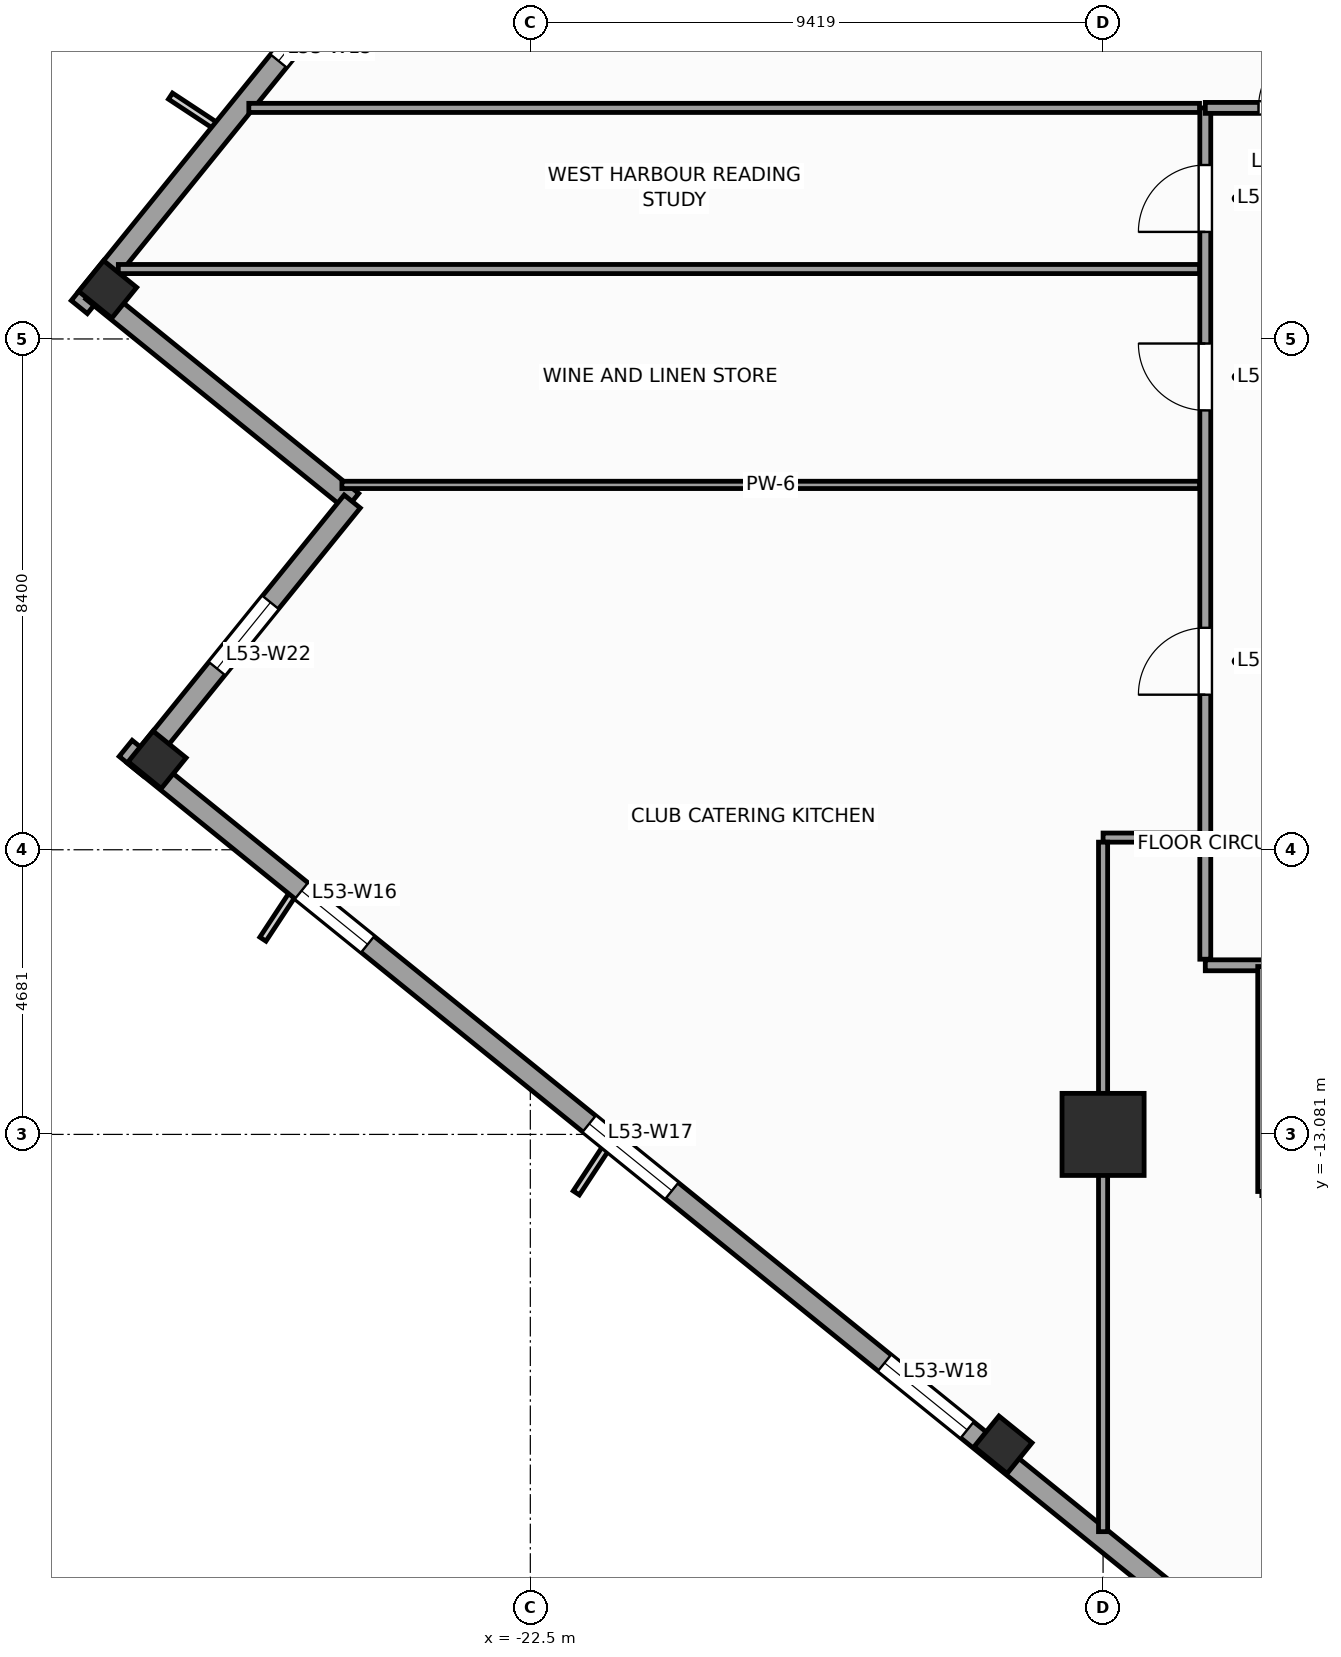
"""IFC4 building model, lengths in metres.
Left out: names, types, materials, properties, quantities, classifications, styles, units other than length and angle.
Written with IfcOpenShell. Run it as: python <this file> out.ifc"""

import sys

from ifc_helpers import new_model, si_unit, direction, frame, frame_2d, origin, origin_2d, place, context, subcontext, project, spatial, rectangle, extrude, source, transform, mapped, element, fill, save


model = new_model("IFC4")
c1 = context("Model", 3, precision=1e-05, world=origin(), true_north=direction((0.0, 1.0)))
c2 = subcontext(c1, "Body", "Model", "MODEL_VIEW")
j1 = project(units=[si_unit("LENGTHUNIT", "METRE"), si_unit("PLANEANGLEUNIT", "RADIAN")], contexts=[c1])
p1 = place(None, origin())
s1 = spatial("IfcSite", under=j1, at=p1, CompositionType="ELEMENT")
p2 = place(p1, origin())
s2 = spatial("IfcBuilding", under=s1, at=p2, CompositionType="ELEMENT")
p3 = place(p2, frame((0.0, 0.0, 221.2)))
s3 = spatial("IfcBuildingStorey", under=s2, at=p3, CompositionType="ELEMENT", Elevation=221.2)
m1 = source(origin(), c2, "Body", "SweptSolid", [
    extrude(rectangle(XDim=1.35, YDim=1.35, at=origin_2d()), origin(), (0.0, 0.0, 1.0), 3.9),
])
p4 = place(p3, frame((-13.081, -13.081, 0.0), z_axis=(0.0, 0.0, 1.0), x_axis=(1.0, 0.0, 0.0)))
e1 = element("IfcColumn", 1, at=p4, inside=s3, PredefinedType="COLUMN", context=c2, shape_type="MappedRepresentation", body=[
    mapped(m1, transform((0.0, 0.0, 0.0), scale=1.0)),
])
m2 = source(origin(), c2, "Body", "SweptSolid", [
    extrude(rectangle(XDim=0.65, YDim=0.7, at=origin_2d()), origin(), (0.0, 0.0, 1.0), 3.9),
])
for number, where, z_axis, x_axis in (
    (2, (-29.45, 0.815, 0.0), (0.0, 0.0, 1.0), (0.629, 0.777, 0.0)),
    (3, (-28.637, -6.92, 0.0), (0.0, 0.0, 1.0), (0.629, 0.777, 0.0)),
    (4, (-14.726, -18.185, 0.0), (0.0, 0.0, 1.0), (0.629, 0.777, 0.0)),
):
    element("IfcColumn", number, at=place(p3, frame(where, z_axis=z_axis, x_axis=x_axis)), inside=s3, PredefinedType="COLUMN", context=c2, shape_type="MappedRepresentation", body=[
        mapped(m2, transform((0.0, 0.0, 0.0), scale=1.0)),
    ])
p5 = place(p3, frame((-6.733, 29.154, 0.0), z_axis=(0.0, 0.0, 1.0), x_axis=(-0.629325378072, -0.77714192302, 0.0)))
e5 = element("IfcWall", 5, at=p5, inside=s3, PredefinedType="STANDARD", context=c2, shape_type="SweptSolid", body=[
    extrude(rectangle(XDim=36.84, YDim=0.34, at=frame_2d((18.42, 0.0))), origin(), (0.0, 0.0, 1.0), 2.96),
])
p6 = place(p5, frame((23.495, 0.0, 0.0)))
e6 = element("IfcOpeningElement", 6, at=p6, cuts=e5, PredefinedType="OPENING", context=c2, shape_type="SweptSolid", body=[
    extrude(rectangle(XDim=1.05, YDim=2.25, at=frame_2d((0.525, 1.125))), frame((0.0, 0.18, 0.0), z_axis=(0.0, -1.0, 0.0), x_axis=(1.0, 0.0, 0.0)), (0.0, 0.0, 1.0), 0.36),
])
p7 = place(p5, frame((3.721, 0.0, 0.48)))
e7 = element("IfcOpeningElement", 7, at=p7, cuts=e5, PredefinedType="OPENING", context=c2, shape_type="SweptSolid", body=[
    extrude(rectangle(XDim=1.4, YDim=2.4, at=frame_2d((0.7, 1.2))), frame((0.0, 0.18, 0.0), z_axis=(0.0, -1.0, 0.0), x_axis=(1.0, 0.0, 0.0)), (0.0, 0.0, 1.0), 0.36),
])
p8 = place(p5, frame((9.809, 0.0, 0.58)))
e8 = element("IfcOpeningElement", 8, at=p8, cuts=e5, PredefinedType="OPENING", context=c2, shape_type="SweptSolid", body=[
    extrude(rectangle(XDim=1.75, YDim=2.3, at=frame_2d((0.875, 1.15))), frame((0.0, 0.18, 0.0), z_axis=(0.0, -1.0, 0.0), x_axis=(1.0, 0.0, 0.0)), (0.0, 0.0, 1.0), 0.36),
])
p9 = place(p5, frame((16.058, 0.0, 0.58)))
e9 = element("IfcOpeningElement", 9, at=p9, cuts=e5, PredefinedType="OPENING", context=c2, shape_type="SweptSolid", body=[
    extrude(rectangle(XDim=1.75, YDim=2.3, at=frame_2d((0.875, 1.15))), frame((0.0, 0.18, 0.0), z_axis=(0.0, -1.0, 0.0), x_axis=(1.0, 0.0, 0.0)), (0.0, 0.0, 1.0), 0.36),
])
p10 = place(p5, frame((25.676, 0.0, 0.58)))
e10 = element("IfcOpeningElement", 10, at=p10, cuts=e5, PredefinedType="OPENING", context=c2, shape_type="SweptSolid", body=[
    extrude(rectangle(XDim=1.75, YDim=2.3, at=frame_2d((0.875, 1.15))), frame((0.0, 0.18, 0.0), z_axis=(0.0, -1.0, 0.0), x_axis=(1.0, 0.0, 0.0)), (0.0, 0.0, 1.0), 0.36),
])
p11 = place(p5, frame((30.232, 0.0, 0.48)))
e11 = element("IfcOpeningElement", 11, at=p11, cuts=e5, PredefinedType="OPENING", context=c2, shape_type="SweptSolid", body=[
    extrude(rectangle(XDim=1.4, YDim=2.4, at=frame_2d((0.7, 1.2))), frame((0.0, 0.18, 0.0), z_axis=(0.0, -1.0, 0.0), x_axis=(1.0, 0.0, 0.0)), (0.0, 0.0, 1.0), 0.36),
])
p12 = place(p3, frame((-29.703, 0.789, 0.0), z_axis=(0.0, 0.0, 1.0), x_axis=(0.77714355312, -0.629323365087, 0.0)))
e12 = element("IfcWall", 12, at=p12, inside=s3, PredefinedType="STANDARD", context=c2, shape_type="SweptSolid", body=[
    extrude(rectangle(XDim=5.5, YDim=0.34, at=frame_2d((2.75, 0.0))), origin(), (0.0, 0.0, 1.0), 3.66),
])
p13 = place(p3, frame((-25.429, -2.673, 0.0), z_axis=(0.0, 0.0, 1.0), x_axis=(-0.629299794138, -0.777162640055, 0.0)))
e13 = element("IfcWall", 13, at=p13, inside=s3, PredefinedType="STANDARD", context=c2, shape_type="SweptSolid", body=[
    extrude(rectangle(XDim=5.67, YDim=0.34, at=frame_2d((2.835, 0.0))), origin(), (0.0, 0.0, 1.0), 3.66),
])
p14 = place(p13, frame((2.135, 0.0, 0.48)))
e14 = element("IfcOpeningElement", 14, at=p14, cuts=e13, PredefinedType="OPENING", context=c2, shape_type="SweptSolid", body=[
    extrude(rectangle(XDim=1.4, YDim=2.4, at=frame_2d((0.7, 1.2))), frame((0.0, 0.18, 0.0), z_axis=(0.0, -1.0, 0.0), x_axis=(1.0, 0.0, 0.0)), (0.0, 0.0, 1.0), 0.36),
])
p15 = place(p3, frame((-29.154, -6.733, 0.0), z_axis=(0.0, 0.0, 1.0), x_axis=(0.77714192302, -0.629325378072, 0.0)))
e15 = element("IfcWall", 15, at=p15, inside=s3, PredefinedType="STANDARD", context=c2, shape_type="SweptSolid", body=[
    extrude(rectangle(XDim=36.84, YDim=0.34, at=frame_2d((18.42, 0.0))), origin(), (0.0, 0.0, 1.0), 2.96),
])
p16 = place(p15, frame((3.721, 0.0, 0.48)))
e16 = element("IfcOpeningElement", 16, at=p16, cuts=e15, PredefinedType="OPENING", context=c2, shape_type="SweptSolid", body=[
    extrude(rectangle(XDim=1.4, YDim=2.4, at=frame_2d((0.7, 1.2))), frame((0.0, 0.18, 0.0), z_axis=(0.0, -1.0, 0.0), x_axis=(1.0, 0.0, 0.0)), (0.0, 0.0, 1.0), 0.36),
])
p17 = place(p15, frame((9.809, 0.0, 0.58)))
e17 = element("IfcOpeningElement", 17, at=p17, cuts=e15, PredefinedType="OPENING", context=c2, shape_type="SweptSolid", body=[
    extrude(rectangle(XDim=1.75, YDim=2.3, at=frame_2d((0.875, 1.15))), frame((0.0, 0.18, 0.0), z_axis=(0.0, -1.0, 0.0), x_axis=(1.0, 0.0, 0.0)), (0.0, 0.0, 1.0), 0.36),
])
p18 = place(p15, frame((16.058, 0.0, 0.58)))
e18 = element("IfcOpeningElement", 18, at=p18, cuts=e15, PredefinedType="OPENING", context=c2, shape_type="SweptSolid", body=[
    extrude(rectangle(XDim=1.75, YDim=2.3, at=frame_2d((0.875, 1.15))), frame((0.0, 0.18, 0.0), z_axis=(0.0, -1.0, 0.0), x_axis=(1.0, 0.0, 0.0)), (0.0, 0.0, 1.0), 0.36),
])
p19 = place(p15, frame((24.176, 0.0, 0.58)))
e19 = element("IfcOpeningElement", 19, at=p19, cuts=e15, PredefinedType="OPENING", context=c2, shape_type="SweptSolid", body=[
    extrude(rectangle(XDim=1.75, YDim=2.3, at=frame_2d((0.875, 1.15))), frame((0.0, 0.18, 0.0), z_axis=(0.0, -1.0, 0.0), x_axis=(1.0, 0.0, 0.0)), (0.0, 0.0, 1.0), 0.36),
])
p20 = place(p15, frame((30.232, 0.0, 0.48)))
e20 = element("IfcOpeningElement", 20, at=p20, cuts=e15, PredefinedType="OPENING", context=c2, shape_type="SweptSolid", body=[
    extrude(rectangle(XDim=1.4, YDim=2.4, at=frame_2d((0.7, 1.2))), frame((0.0, 0.18, 0.0), z_axis=(0.0, -1.0, 0.0), x_axis=(1.0, 0.0, 0.0)), (0.0, 0.0, 1.0), 0.36),
])
p21 = place(p3, frame((-11.4, -10.3, 0.0), z_axis=(0.0, 0.0, 1.0), x_axis=(1.0, 0.0, 0.0)))
e21 = element("IfcWall", 21, at=p21, inside=s3, PredefinedType="PARTITIONING", context=c2, shape_type="SweptSolid", body=[
    extrude(rectangle(XDim=22.75, YDim=0.18, at=frame_2d((11.375, 0.0))), origin(), (0.0, 0.0, 1.0), 3.66),
])
p22 = place(p21, frame((8.436, 0.0, 0.0)))
e22 = element("IfcOpeningElement", 22, at=p22, cuts=e21, PredefinedType="OPENING", context=c2, shape_type="SweptSolid", body=[
    extrude(rectangle(XDim=0.95, YDim=2.1, at=frame_2d((0.475, 1.05))), frame((0.0, 0.1, 0.0), z_axis=(0.0, -1.0, 0.0), x_axis=(1.0, 0.0, 0.0)), (0.0, 0.0, 1.0), 0.2),
])
p23 = place(p21, frame((1.58, 0.0, 0.0)))
e23 = element("IfcOpeningElement", 23, at=p23, cuts=e21, PredefinedType="OPENING", context=c2, shape_type="SweptSolid", body=[
    extrude(rectangle(XDim=0.95, YDim=2.1, at=frame_2d((0.475, 1.05))), frame((0.0, 0.1, 0.0), z_axis=(0.0, -1.0, 0.0), x_axis=(1.0, 0.0, 0.0)), (0.0, 0.0, 1.0), 0.2),
])
p24 = place(p21, frame((4.834, 0.0, 0.0)))
e24 = element("IfcOpeningElement", 24, at=p24, cuts=e21, PredefinedType="OPENING", context=c2, shape_type="SweptSolid", body=[
    extrude(rectangle(XDim=1.1, YDim=2.2, at=frame_2d((0.55, 1.1))), frame((0.0, 0.1, 0.0), z_axis=(0.0, -1.0, 0.0), x_axis=(1.0, 0.0, 0.0)), (0.0, 0.0, 1.0), 0.2),
])
p25 = place(p21, frame((12.0, 0.0, 0.0)))
e25 = element("IfcOpeningElement", 25, at=p25, cuts=e21, PredefinedType="OPENING", context=c2, shape_type="SweptSolid", body=[
    extrude(rectangle(XDim=1.1, YDim=2.2, at=frame_2d((0.55, 1.1))), frame((0.0, 0.1, 0.0), z_axis=(0.0, -1.0, 0.0), x_axis=(1.0, 0.0, 0.0)), (0.0, 0.0, 1.0), 0.2),
])
p26 = place(p21, frame((18.041, 0.0, 0.0)))
e26 = element("IfcOpeningElement", 26, at=p26, cuts=e21, PredefinedType="OPENING", context=c2, shape_type="SweptSolid", body=[
    extrude(rectangle(XDim=1.1, YDim=2.2, at=frame_2d((0.55, 1.1))), frame((0.0, 0.1, 0.0), z_axis=(0.0, -1.0, 0.0), x_axis=(1.0, 0.0, 0.0)), (0.0, 0.0, 1.0), 0.2),
])
p27 = place(p3, frame((-11.4, -10.2, 0.0), z_axis=(0.0, 0.0, 1.0), x_axis=(0.0, 1.0, 0.0)))
e27 = element("IfcWall", 27, at=p27, inside=s3, PredefinedType="PARTITIONING", context=c2, shape_type="SweptSolid", body=[
    extrude(rectangle(XDim=14.0, YDim=0.18, at=frame_2d((7.0, 0.0))), origin(), (0.0, 0.0, 1.0), 3.66),
])
p28 = place(p27, frame((11.96, 0.0, 0.0)))
e28 = element("IfcOpeningElement", 28, at=p28, cuts=e27, PredefinedType="OPENING", context=c2, shape_type="SweptSolid", body=[
    extrude(rectangle(XDim=1.1, YDim=2.2, at=frame_2d((0.55, 1.1))), frame((0.0, 0.1, 0.0), z_axis=(0.0, -1.0, 0.0), x_axis=(1.0, 0.0, 0.0)), (0.0, 0.0, 1.0), 0.2),
])
p29 = place(p27, frame((9.025, 0.0, 0.0)))
e29 = element("IfcOpeningElement", 29, at=p29, cuts=e27, PredefinedType="OPENING", context=c2, shape_type="SweptSolid", body=[
    extrude(rectangle(XDim=1.1, YDim=2.2, at=frame_2d((0.55, 1.1))), frame((0.0, 0.1, 0.0), z_axis=(0.0, -1.0, 0.0), x_axis=(1.0, 0.0, 0.0)), (0.0, 0.0, 1.0), 0.2),
])
p30 = place(p27, frame((4.35, 0.0, 0.0)))
e30 = element("IfcOpeningElement", 30, at=p30, cuts=e27, PredefinedType="OPENING", context=c2, shape_type="SweptSolid", body=[
    extrude(rectangle(XDim=1.1, YDim=2.2, at=frame_2d((0.55, 1.1))), frame((0.0, 0.1, 0.0), z_axis=(0.0, -1.0, 0.0), x_axis=(1.0, 0.0, 0.0)), (0.0, 0.0, 1.0), 0.2),
])
p31 = place(p3, frame((-11.4, 3.8, 0.0), z_axis=(0.0, 0.0, 1.0), x_axis=(1.0, 0.0, 0.0)))
e31 = element("IfcWall", 31, at=p31, inside=s3, PredefinedType="PARTITIONING", context=c2, shape_type="SweptSolid", body=[
    extrude(rectangle(XDim=2.85, YDim=0.18, at=frame_2d((1.425, 0.0))), origin(), (0.0, 0.0, 1.0), 3.66),
])
p32 = place(p31, frame((0.875, 0.0, 0.0)))
e32 = element("IfcOpeningElement", 32, at=p32, cuts=e31, PredefinedType="OPENING", context=c2, shape_type="SweptSolid", body=[
    extrude(rectangle(XDim=1.1, YDim=2.2, at=frame_2d((0.55, 1.1))), frame((0.0, 0.1, 0.0), z_axis=(0.0, -1.0, 0.0), x_axis=(1.0, 0.0, 0.0)), (0.0, 0.0, 1.0), 0.2),
])
p33 = place(p3, frame((-29.275, 1.15, 0.0), z_axis=(0.0, 0.0, 1.0), x_axis=(1.0, 0.0, 0.0)))
e33 = element("IfcWall", 33, at=p33, inside=s3, PredefinedType="PARTITIONING", context=c2, shape_type="SweptSolid", body=[
    extrude(rectangle(XDim=17.78, YDim=0.15, at=frame_2d((8.89, 0.0))), origin(), (0.0, 0.0, 1.0), 3.66),
])
p34 = place(p3, frame((-27.129, 3.8, 0.0), z_axis=(0.0, 0.0, 1.0), x_axis=(1.0, 0.0, 0.0)))
e34 = element("IfcWall", 34, at=p34, inside=s3, PredefinedType="PARTITIONING", context=c2, shape_type="SweptSolid", body=[
    extrude(rectangle(XDim=15.634, YDim=0.15, at=frame_2d((7.817, 0.0))), origin(), (0.0, 0.0, 1.0), 3.66),
])
p35 = place(p3, frame((-11.495, -8.2, 0.0), z_axis=(0.0, 0.0, 1.0), x_axis=(-1.0, 0.0, 0.0)))
e35 = element("IfcWall", 35, at=p35, inside=s3, PredefinedType="PARTITIONING", context=c2, shape_type="SweptSolid", body=[
    extrude(rectangle(XDim=1.586, YDim=0.15, at=frame_2d((0.793, 0.0))), origin(), (0.0, 0.0, 1.0), 3.66),
])
p36 = place(p3, frame((-13.081, -8.275, 0.0), z_axis=(0.0, 0.0, 1.0), x_axis=(0.0, -1.0, 0.0)))
e36 = element("IfcWall", 36, at=p36, inside=s3, PredefinedType="PARTITIONING", context=c2, shape_type="SweptSolid", body=[
    extrude(rectangle(XDim=11.339, YDim=0.15, at=frame_2d((5.669, 0.0))), origin(), (0.0, 0.0, 1.0), 2.76),
])
p37 = place(p3, frame((-25.599, -2.4, 0.0), z_axis=(0.0, 0.0, 1.0), x_axis=(1.0, 0.0, 0.0)))
e37 = element("IfcWall", 37, at=p37, inside=s3, PredefinedType="PARTITIONING", context=c2, shape_type="SweptSolid", body=[
    extrude(rectangle(XDim=14.104, YDim=0.12, at=frame_2d((7.052, 0.0))), origin(), (0.0, 0.0, 1.0), 3.66),
])
p38 = place(p3, frame((-10.47, -14.02, 0.0), z_axis=(0.0, 0.0, 1.0), x_axis=(0.0, 1.0, 0.0)))
e38 = element("IfcWall", 38, at=p38, inside=s3, PredefinedType="PARTITIONING", context=c2, shape_type="SweptSolid", body=[
    extrude(rectangle(XDim=3.7, YDim=0.135, at=frame_2d((1.85, 0.0))), origin(), (0.0, 0.0, 1.0), 3.66),
])
m3 = source(origin(), c2, "Body", "SweptSolid", [
    extrude(rectangle(XDim=1.4, YDim=2.4, at=frame_2d((0.7, 1.2))), frame((0.0, 0.03, 0.0), z_axis=(0.0, -1.0, 0.0), x_axis=(1.0, 0.0, 0.0)), (0.0, 0.0, 1.0), 0.06),
])
p39 = place(p11, origin())
e39 = element("IfcWindow", 39, at=p39, inside=s3, PartitioningType="SINGLE_PANEL", PredefinedType="WINDOW", context=c2, shape_type="MappedRepresentation", body=[
    mapped(m3, transform((0.0, 0.0, 0.0), scale=1.0)),
])
fill(e11, e39)
p40 = place(p16, origin())
e40 = element("IfcWindow", 40, at=p40, inside=s3, PartitioningType="SINGLE_PANEL", PredefinedType="WINDOW", context=c2, shape_type="MappedRepresentation", body=[
    mapped(m3, transform((0.0, 0.0, 0.0), scale=1.0)),
])
fill(e16, e40)
m4 = source(origin(), c2, "Body", "SweptSolid", [
    extrude(rectangle(XDim=1.75, YDim=2.3, at=frame_2d((0.875, 1.15))), frame((0.0, 0.03, 0.0), z_axis=(0.0, -1.0, 0.0), x_axis=(1.0, 0.0, 0.0)), (0.0, 0.0, 1.0), 0.06),
])
p41 = place(p17, origin())
e41 = element("IfcWindow", 41, at=p41, inside=s3, PartitioningType="SINGLE_PANEL", PredefinedType="WINDOW", context=c2, shape_type="MappedRepresentation", body=[
    mapped(m4, transform((0.0, 0.0, 0.0), scale=1.0)),
])
fill(e17, e41)
p42 = place(p18, origin())
e42 = element("IfcWindow", 42, at=p42, inside=s3, PartitioningType="SINGLE_PANEL", PredefinedType="WINDOW", context=c2, shape_type="MappedRepresentation", body=[
    mapped(m4, transform((0.0, 0.0, 0.0), scale=1.0)),
])
fill(e18, e42)
p43 = place(p14, origin())
e43 = element("IfcWindow", 43, at=p43, inside=s3, PartitioningType="SINGLE_PANEL", PredefinedType="WINDOW", context=c2, shape_type="MappedRepresentation", body=[
    mapped(m3, transform((0.0, 0.0, 0.0), scale=1.0)),
])
fill(e14, e43)
m5 = source(origin(), c2, "Body", "SweptSolid", [
    extrude(rectangle(XDim=1.1, YDim=2.2, at=frame_2d((0.55, 1.1))), frame((0.0, 0.025, 0.0), z_axis=(0.0, -1.0, 0.0), x_axis=(1.0, 0.0, 0.0)), (0.0, 0.0, 1.0), 0.05),
])
p44 = place(p28, origin())
e44 = element("IfcDoor", 44, at=p44, inside=s3, OperationType="SINGLE_SWING_LEFT", PredefinedType="DOOR", context=c2, shape_type="MappedRepresentation", body=[
    mapped(m5, transform((0.0, 0.0, 0.0), scale=1.0)),
])
fill(e28, e44)
p45 = place(p32, origin())
e45 = element("IfcDoor", 45, at=p45, inside=s3, OperationType="SINGLE_SWING_RIGHT", PredefinedType="DOOR", context=c2, shape_type="MappedRepresentation", body=[
    mapped(m5, transform((0.0, 0.0, 0.0), scale=1.0)),
])
fill(e32, e45)
p46 = place(p29, origin())
e46 = element("IfcDoor", 46, at=p46, inside=s3, OperationType="SINGLE_SWING_RIGHT", PredefinedType="DOOR", context=c2, shape_type="MappedRepresentation", body=[
    mapped(m5, transform((0.0, 0.0, 0.0), scale=1.0)),
])
fill(e29, e46)
p47 = place(p30, origin())
e47 = element("IfcDoor", 47, at=p47, inside=s3, OperationType="SINGLE_SWING_LEFT", PredefinedType="DOOR", context=c2, shape_type="MappedRepresentation", body=[
    mapped(m5, transform((0.0, 0.0, 0.0), scale=1.0)),
])
fill(e30, e47)
save(model, sys.argv[1])
